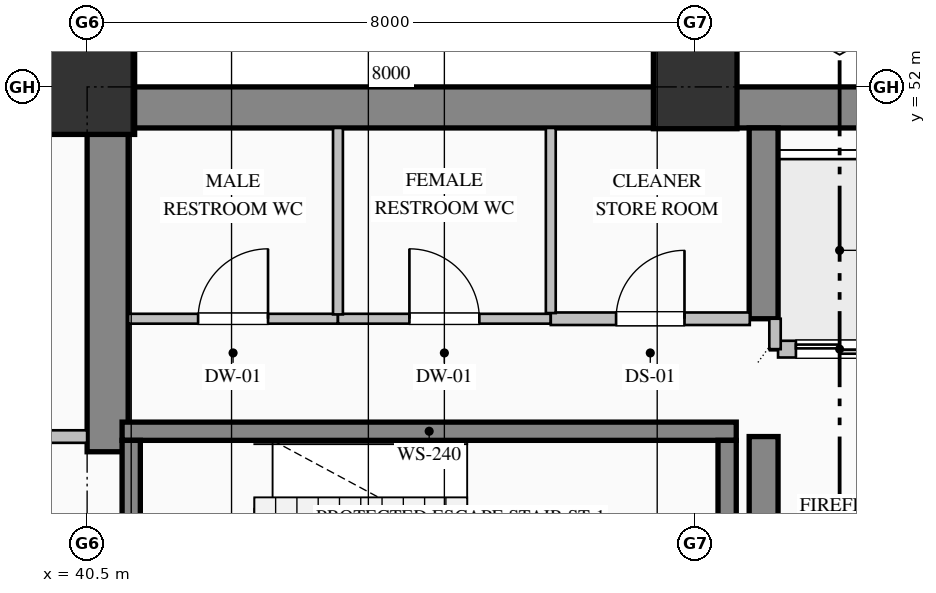
"""IFC4 building model, lengths in metres.
Left out: names, types, materials, properties, quantities, classifications, styles, units other than length and angle.
Written with IfcOpenShell. Run it as: python <this file> out.ifc"""

import sys

from ifc_helpers import new_model, si_unit, direction, frame, frame_2d, origin, origin_2d, place, context, subcontext, project, spatial, rectangle, hollow_rectangle, extrude, element, fill, save


model = new_model("IFC4")
c1 = context("Model", 3, precision=1e-05, world=origin(), true_north=direction((0.0, 1.0)))
c2 = subcontext(c1, "Body", "Model", "MODEL_VIEW")
j1 = project(units=[si_unit("LENGTHUNIT", "METRE"), si_unit("PLANEANGLEUNIT", "RADIAN")], contexts=[c1])
p1 = place(None, origin())
s1 = spatial("IfcSite", under=j1, at=p1, CompositionType="ELEMENT")
p2 = place(p1, origin())
s2 = spatial("IfcBuilding", under=s1, at=p2, CompositionType="ELEMENT")
p3 = place(p2, frame((0.0, 0.0, 88.2)))
s3 = spatial("IfcBuildingStorey", under=s2, at=p3, CompositionType="ELEMENT", Elevation=88.2)
p4 = place(p3, frame((40.5, 51.73, 0.0), z_axis=(0.0, 0.0, 1.0), x_axis=(1.0, 0.0, 0.0)))
e1 = element("IfcWall", 1, at=p4, inside=s3, PredefinedType="SHEAR", context=c2, shape_type="SweptSolid", body=[
    extrude(rectangle(XDim=23.5, YDim=0.54, at=frame_2d((11.75, 0.0))), origin(), (0.0, 0.0, 1.0), 3.75),
])
p5 = place(p3, frame((40.77, 47.2, 0.0), z_axis=(0.0, 0.0, 1.0), x_axis=(0.0, 1.0, 0.0)))
e2 = element("IfcWall", 2, at=p5, inside=s3, PredefinedType="SHEAR", context=c2, shape_type="SweptSolid", body=[
    extrude(rectangle(XDim=4.26, YDim=0.54, at=frame_2d((2.13, 0.0))), origin(), (0.0, 0.0, 1.0), 3.75),
])
p6 = place(p3, frame((49.4, 44.4, 0.0), z_axis=(0.0, 0.0, 1.0), x_axis=(0.0, 1.0, 0.0)))
e3 = element("IfcWall", 3, at=p6, inside=s3, PredefinedType="SHEAR", context=c2, shape_type="SweptSolid", body=[
    extrude(rectangle(XDim=3.0, YDim=0.38, at=frame_2d((1.5, 0.0))), origin(), (0.0, 0.0, 1.0), 3.75),
])
p7 = place(p3, frame((49.4, 48.95, 0.0), z_axis=(0.0, 0.0, 1.0), x_axis=(0.0, 1.0, 0.0)))
e4 = element("IfcWall", 4, at=p7, inside=s3, PredefinedType="SHEAR", context=c2, shape_type="SweptSolid", body=[
    extrude(rectangle(XDim=2.51, YDim=0.38, at=frame_2d((1.255, 0.0))), origin(), (0.0, 0.0, 1.0), 3.75),
])
p8 = place(p3, frame((40.5, 52.0, 0.0), z_axis=(0.0, 0.0, 1.0), x_axis=(1.0, 0.0, 0.0)))
e5 = element("IfcColumn", 5, at=p8, inside=s3, PredefinedType="COLUMN", context=c2, shape_type="SweptSolid", body=[
    extrude(hollow_rectangle(XDim=1.25, YDim=1.25, WallThickness=0.045, at=origin_2d()), origin(), (0.0, 0.0, 1.0), 4.0),
])
p9 = place(p3, frame((48.5, 52.0, 0.0), z_axis=(0.0, 0.0, 1.0), x_axis=(1.0, 0.0, 0.0)))
e6 = element("IfcColumn", 6, at=p9, inside=s3, PredefinedType="COLUMN", context=c2, shape_type="SweptSolid", body=[
    extrude(hollow_rectangle(XDim=1.1, YDim=1.1, WallThickness=0.04, at=origin_2d()), origin(), (0.0, 0.0, 1.0), 4.0),
])
p10 = place(p3, frame((4.0, 51.82, 0.0), z_axis=(0.0, 0.0, 1.0), x_axis=(1.0, 0.0, 0.0)))
e7 = element("IfcWall", 7, at=p10, inside=s3, PredefinedType="SOLIDWALL", context=c2, shape_type="SweptSolid", body=[
    extrude(rectangle(XDim=36.52, YDim=0.36, at=frame_2d((18.26, 0.0))), origin(), (0.0, 0.0, 1.0), 3.25),
])
p11 = place(p10, frame((6.3, 0.0, 0.85)))
e8 = element("IfcOpeningElement", 8, at=p11, cuts=e7, PredefinedType="OPENING", context=c2, shape_type="SweptSolid", body=[
    extrude(rectangle(XDim=1.8, YDim=2.05, at=frame_2d((0.9, 1.025))), frame((0.0, 0.19, 0.0), z_axis=(0.0, -1.0, 0.0), x_axis=(1.0, 0.0, 0.0)), (0.0, 0.0, 1.0), 0.38),
])
p12 = place(p10, frame((17.1, 0.0, 0.85)))
e9 = element("IfcOpeningElement", 9, at=p12, cuts=e7, PredefinedType="OPENING", context=c2, shape_type="SweptSolid", body=[
    extrude(rectangle(XDim=1.8, YDim=2.05, at=frame_2d((0.9, 1.025))), frame((0.0, 0.19, 0.0), z_axis=(0.0, -1.0, 0.0), x_axis=(1.0, 0.0, 0.0)), (0.0, 0.0, 1.0), 0.38),
])
p13 = place(p10, frame((24.0, 0.0, 0.8)))
e10 = element("IfcOpeningElement", 10, at=p13, cuts=e7, PredefinedType="OPENING", context=c2, shape_type="SweptSolid", body=[
    extrude(rectangle(XDim=2.4, YDim=2.15, at=frame_2d((1.2, 1.075))), frame((0.0, 0.19, 0.0), z_axis=(0.0, -1.0, 0.0), x_axis=(1.0, 0.0, 0.0)), (0.0, 0.0, 1.0), 0.38),
])
p14 = place(p3, frame((40.96, 47.47, 0.0), z_axis=(0.0, 0.0, 1.0), x_axis=(1.0, 0.0, 0.0)))
e11 = element("IfcWall", 11, at=p14, inside=s3, PredefinedType="SOLIDWALL", context=c2, shape_type="SweptSolid", body=[
    extrude(rectangle(XDim=8.08, YDim=0.24, at=frame_2d((4.04, 0.0))), origin(), (0.0, 0.0, 1.0), 4.0),
])
p15 = place(p3, frame((41.08, 47.35, 0.0), z_axis=(0.0, 0.0, 1.0), x_axis=(0.0, -1.0, 0.0)))
e12 = element("IfcWall", 12, at=p15, inside=s3, PredefinedType="SOLIDWALL", context=c2, shape_type="SweptSolid", body=[
    extrude(rectangle(XDim=3.15, YDim=0.24, at=frame_2d((1.575, 0.0))), origin(), (0.0, 0.0, 1.0), 4.0),
])
p16 = place(p15, frame((1.0, 0.0, 0.0)))
e13 = element("IfcOpeningElement", 13, at=p16, cuts=e12, PredefinedType="OPENING", context=c2, shape_type="SweptSolid", body=[
    extrude(rectangle(XDim=1.15, YDim=2.2, at=frame_2d((0.575, 1.1))), frame((0.0, 0.13, 0.0), z_axis=(0.0, -1.0, 0.0), x_axis=(1.0, 0.0, 0.0)), (0.0, 0.0, 1.0), 0.26),
])
p17 = place(p3, frame((48.92, 44.2, 0.0), z_axis=(0.0, 0.0, 1.0), x_axis=(0.0, 1.0, 0.0)))
e14 = element("IfcWall", 14, at=p17, inside=s3, PredefinedType="SOLIDWALL", context=c2, shape_type="SweptSolid", body=[
    extrude(rectangle(XDim=3.15, YDim=0.24, at=frame_2d((1.575, 0.0))), origin(), (0.0, 0.0, 1.0), 4.0),
])
p18 = place(p3, frame((54.71, 48.55, 0.0), z_axis=(0.0, 0.0, 1.0), x_axis=(-1.0, 0.0, 0.0)))
e15 = element("IfcWall", 15, at=p18, inside=s3, PredefinedType="PARTITIONING", context=c2, shape_type="SweptSolid", body=[
    extrude(rectangle(XDim=5.12, YDim=0.22, at=frame_2d((2.56, 0.0))), origin(), (0.0, 0.0, 1.0), 3.75),
])
p19 = place(p18, frame((3.735, 0.0, 0.0)))
e16 = element("IfcOpeningElement", 16, at=p19, cuts=e15, PredefinedType="OPENING", context=c2, shape_type="SweptSolid", body=[
    extrude(rectangle(XDim=1.15, YDim=2.2, at=frame_2d((0.575, 1.1))), frame((0.0, 0.12, 0.0), z_axis=(0.0, -1.0, 0.0), x_axis=(1.0, 0.0, 0.0)), (0.0, 0.0, 1.0), 0.24),
])
p20 = place(p18, frame((0.935, 0.0, 0.0)))
e17 = element("IfcOpeningElement", 17, at=p20, cuts=e15, PredefinedType="OPENING", context=c2, shape_type="SweptSolid", body=[
    extrude(rectangle(XDim=1.15, YDim=2.2, at=frame_2d((0.575, 1.1))), frame((0.0, 0.12, 0.0), z_axis=(0.0, -1.0, 0.0), x_axis=(1.0, 0.0, 0.0)), (0.0, 0.0, 1.0), 0.24),
])
p21 = place(p3, frame((49.55, 48.55, 0.0), z_axis=(0.0, 0.0, 1.0), x_axis=(0.0, 1.0, 0.0)))
e18 = element("IfcWall", 18, at=p21, inside=s3, PredefinedType="PARTITIONING", context=c2, shape_type="SweptSolid", body=[
    extrude(rectangle(XDim=0.4, YDim=0.15, at=frame_2d((0.2, 0.0))), origin(), (0.0, 0.0, 1.0), 3.75),
])
p22 = place(p3, frame((37.8, 47.4, 0.0), z_axis=(0.0, 0.0, 1.0), x_axis=(1.0, 0.0, 0.0)))
e19 = element("IfcWall", 19, at=p22, inside=s3, PredefinedType="PARTITIONING", context=c2, shape_type="SweptSolid", body=[
    extrude(rectangle(XDim=2.7, YDim=0.165, at=frame_2d((1.35, 0.0))), origin(), (0.0, 0.0, 1.0), 3.75),
])
p23 = place(p22, frame((0.825, 0.0, 0.0)))
e20 = element("IfcOpeningElement", 20, at=p23, cuts=e19, PredefinedType="OPENING", context=c2, shape_type="SweptSolid", body=[
    extrude(rectangle(XDim=1.05, YDim=2.15, at=frame_2d((0.525, 1.075))), frame((0.0, 0.093, 0.0), z_axis=(0.0, -1.0, 0.0), x_axis=(1.0, 0.0, 0.0)), (0.0, 0.0, 1.0), 0.185),
])
p24 = place(p3, frame((41.04, 48.95, 0.0), z_axis=(0.0, 0.0, 1.0), x_axis=(1.0, 0.0, 0.0)))
e21 = element("IfcWall", 21, at=p24, inside=s3, PredefinedType="PARTITIONING", context=c2, shape_type="SweptSolid", body=[
    extrude(rectangle(XDim=2.76, YDim=0.13, at=frame_2d((1.38, 0.0))), origin(), (0.0, 0.0, 1.0), 3.75),
])
p25 = place(p24, frame((0.92, 0.0, 0.0)))
e22 = element("IfcOpeningElement", 22, at=p25, cuts=e21, PredefinedType="OPENING", context=c2, shape_type="SweptSolid", body=[
    extrude(rectangle(XDim=0.92, YDim=2.15, at=frame_2d((0.46, 1.075))), frame((0.0, 0.075, 0.0), z_axis=(0.0, -1.0, 0.0), x_axis=(1.0, 0.0, 0.0)), (0.0, 0.0, 1.0), 0.15),
])
p26 = place(p3, frame((43.8, 48.95, 0.0), z_axis=(0.0, 0.0, 1.0), x_axis=(1.0, 0.0, 0.0)))
e23 = element("IfcWall", 23, at=p26, inside=s3, PredefinedType="PARTITIONING", context=c2, shape_type="SweptSolid", body=[
    extrude(rectangle(XDim=2.8, YDim=0.13, at=frame_2d((1.4, 0.0))), origin(), (0.0, 0.0, 1.0), 3.75),
])
p27 = place(p26, frame((0.94, 0.0, 0.0)))
e24 = element("IfcOpeningElement", 24, at=p27, cuts=e23, PredefinedType="OPENING", context=c2, shape_type="SweptSolid", body=[
    extrude(rectangle(XDim=0.92, YDim=2.15, at=frame_2d((0.46, 1.075))), frame((0.0, 0.075, 0.0), z_axis=(0.0, -1.0, 0.0), x_axis=(1.0, 0.0, 0.0)), (0.0, 0.0, 1.0), 0.15),
])
p28 = place(p3, frame((46.6, 48.95, 0.0), z_axis=(0.0, 0.0, 1.0), x_axis=(1.0, 0.0, 0.0)))
e25 = element("IfcWall", 25, at=p28, inside=s3, PredefinedType="PARTITIONING", context=c2, shape_type="SweptSolid", body=[
    extrude(rectangle(XDim=2.618, YDim=0.165, at=frame_2d((1.309, 0.0))), origin(), (0.0, 0.0, 1.0), 3.75),
])
p29 = place(p28, frame((0.859, 0.0, 0.0)))
e26 = element("IfcOpeningElement", 26, at=p29, cuts=e25, PredefinedType="OPENING", context=c2, shape_type="SweptSolid", body=[
    extrude(rectangle(XDim=0.9, YDim=2.15, at=frame_2d((0.45, 1.075))), frame((0.0, 0.093, 0.0), z_axis=(0.0, -1.0, 0.0), x_axis=(1.0, 0.0, 0.0)), (0.0, 0.0, 1.0), 0.185),
])
p30 = place(p3, frame((43.8, 51.46, 0.0), z_axis=(0.0, 0.0, 1.0), x_axis=(0.0, -1.0, 0.0)))
e27 = element("IfcWall", 27, at=p30, inside=s3, PredefinedType="PARTITIONING", context=c2, shape_type="SweptSolid", body=[
    extrude(rectangle(XDim=2.453, YDim=0.13, at=frame_2d((1.227, 0.0))), origin(), (0.0, 0.0, 1.0), 3.75),
])
p31 = place(p3, frame((46.6, 51.46, 0.0), z_axis=(0.0, 0.0, 1.0), x_axis=(0.0, -1.0, 0.0)))
e28 = element("IfcWall", 28, at=p31, inside=s3, PredefinedType="PARTITIONING", context=c2, shape_type="SweptSolid", body=[
    extrude(rectangle(XDim=2.436, YDim=0.13, at=frame_2d((1.218, 0.0))), origin(), (0.0, 0.0, 1.0), 3.75),
])
p32 = place(p19, origin())
e29 = element("IfcDoor", 29, at=p32, inside=s3, OperationType="DOUBLE_DOOR_SLIDING", PredefinedType="DOOR", context=c2, shape_type="SweptSolid", body=[
    extrude(rectangle(XDim=1.15, YDim=2.2, at=frame_2d((0.575, 1.1))), frame((0.0, 0.025, 0.0), z_axis=(0.0, -1.0, 0.0), x_axis=(1.0, 0.0, 0.0)), (0.0, 0.0, 1.0), 0.05),
])
fill(e16, e29)
p33 = place(p25, origin())
e30 = element("IfcDoor", 30, at=p33, inside=s3, OperationType="SINGLE_SWING_RIGHT", PredefinedType="DOOR", context=c2, shape_type="SweptSolid", body=[
    extrude(rectangle(XDim=0.92, YDim=2.15, at=frame_2d((0.46, 1.075))), frame((0.0, 0.025, 0.0), z_axis=(0.0, -1.0, 0.0), x_axis=(1.0, 0.0, 0.0)), (0.0, 0.0, 1.0), 0.05),
])
fill(e22, e30)
p34 = place(p27, origin())
e31 = element("IfcDoor", 31, at=p34, inside=s3, OperationType="SINGLE_SWING_LEFT", PredefinedType="DOOR", context=c2, shape_type="SweptSolid", body=[
    extrude(rectangle(XDim=0.92, YDim=2.15, at=frame_2d((0.46, 1.075))), frame((0.0, 0.025, 0.0), z_axis=(0.0, -1.0, 0.0), x_axis=(1.0, 0.0, 0.0)), (0.0, 0.0, 1.0), 0.05),
])
fill(e24, e31)
p35 = place(p29, origin())
e32 = element("IfcDoor", 32, at=p35, inside=s3, OperationType="SINGLE_SWING_RIGHT", PredefinedType="DOOR", context=c2, shape_type="SweptSolid", body=[
    extrude(rectangle(XDim=0.9, YDim=2.15, at=frame_2d((0.45, 1.075))), frame((0.0, 0.025, 0.0), z_axis=(0.0, -1.0, 0.0), x_axis=(1.0, 0.0, 0.0)), (0.0, 0.0, 1.0), 0.05),
])
fill(e26, e32)
save(model, sys.argv[1])
